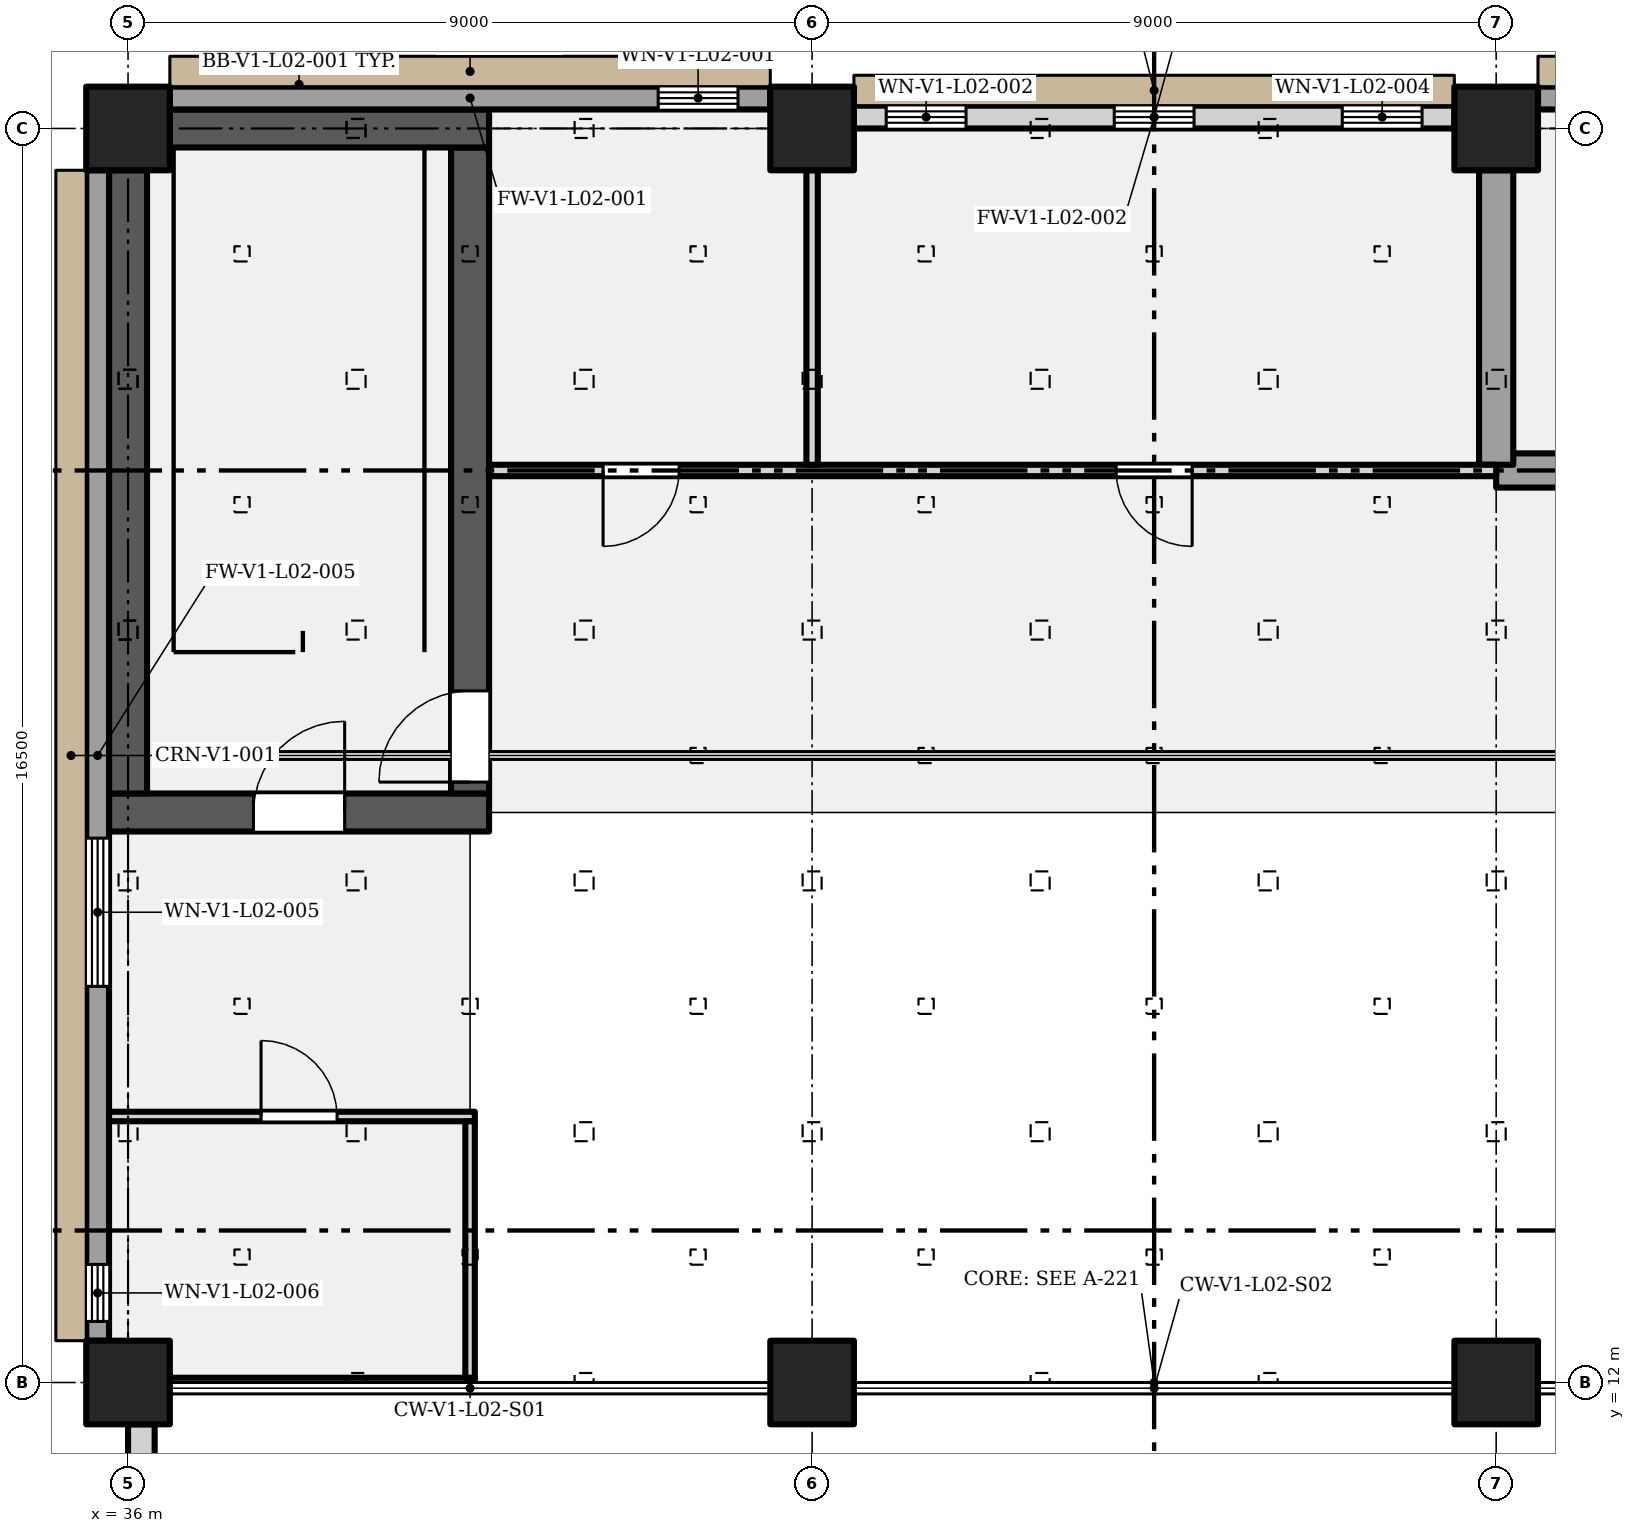
"""IFC4 building model, lengths in metres.
Left out: names, types, materials, properties, quantities, classifications, styles, units other than length and angle.
Written with IfcOpenShell. Run it as: python <this file> out.ifc"""

import sys

from ifc_helpers import new_model, si_unit, direction, frame, frame_2d, origin, origin_2d, place, context, subcontext, project, spatial, rectangle, extrude, element, fill, save


model = new_model("IFC4")
c1 = context("Model", 3, precision=1e-05, world=origin(), true_north=direction((0.0, 1.0)))
c2 = subcontext(c1, "Body", "Model", "MODEL_VIEW")
j1 = project(units=[si_unit("LENGTHUNIT", "METRE"), si_unit("PLANEANGLEUNIT", "RADIAN")], contexts=[c1])
p1 = place(None, origin())
s1 = spatial("IfcSite", under=j1, at=p1, CompositionType="ELEMENT")
p2 = place(p1, origin())
s2 = spatial("IfcBuilding", under=s1, at=p2, CompositionType="ELEMENT")
p3 = place(p2, frame((0.0, 0.0, 12.0)))
s3 = spatial("IfcBuildingStorey", under=s2, at=p3, CompositionType="ELEMENT", Elevation=12.0)
for number, where, z_axis, x_axis in (
    (1, (36.0, 12.0, 0.0), (0.0, 0.0, 1.0), (1.0, 0.0, 0.0)),
    (2, (45.0, 12.0, 0.0), (0.0, 0.0, 1.0), (1.0, 0.0, 0.0)),
    (3, (54.0, 12.0, 0.0), (0.0, 0.0, 1.0), (1.0, 0.0, 0.0)),
    (4, (36.0, 28.5, 0.0), (0.0, 0.0, 1.0), (1.0, 0.0, 0.0)),
    (5, (45.0, 28.5, 0.0), (0.0, 0.0, 1.0), (1.0, 0.0, 0.0)),
    (6, (54.0, 28.5, 0.0), (0.0, 0.0, 1.0), (1.0, 0.0, 0.0)),
):
    element("IfcColumn", number, at=place(p3, frame(where, z_axis=z_axis, x_axis=x_axis)), inside=s3, PredefinedType="COLUMN", context=c2, shape_type="SweptSolid", body=[
        extrude(rectangle(XDim=1.1, YDim=1.1, at=origin_2d()), origin(), (0.0, 0.0, 1.0), 5.4),
    ])
p4 = place(p3, frame((35.75, 19.5, 0.0), z_axis=(0.0, 0.0, 1.0), x_axis=(1.0, 0.0, 0.0)))
e7 = element("IfcWall", 7, at=p4, inside=s3, PredefinedType="SHEAR", context=c2, shape_type="SweptSolid", body=[
    extrude(rectangle(XDim=5.0, YDim=0.5, at=frame_2d((2.5, 0.0))), origin(), (0.0, 0.0, 1.0), 5.4),
])
p5 = place(p4, frame((1.9, 0.0, 0.0)))
e8 = element("IfcOpeningElement", 8, at=p5, cuts=e7, PredefinedType="OPENING", context=c2, shape_type="SweptSolid", body=[
    extrude(rectangle(XDim=1.2, YDim=2.1, at=frame_2d((0.6, 1.05))), frame((0.0, 0.26, 0.0), z_axis=(0.0, -1.0, 0.0), x_axis=(1.0, 0.0, 0.0)), (0.0, 0.0, 1.0), 0.52),
])
p6 = place(p3, frame((36.0, 19.75, 0.0), z_axis=(0.0, 0.0, 1.0), x_axis=(0.0, 1.0, 0.0)))
e9 = element("IfcWall", 9, at=p6, inside=s3, PredefinedType="SHEAR", context=c2, shape_type="SweptSolid", body=[
    extrude(rectangle(XDim=8.2, YDim=0.5, at=frame_2d((4.1, 0.0))), origin(), (0.0, 0.0, 1.0), 5.4),
])
p7 = place(p3, frame((40.5, 19.75, 0.0), z_axis=(0.0, 0.0, 1.0), x_axis=(0.0, 1.0, 0.0)))
e10 = element("IfcWall", 10, at=p7, inside=s3, PredefinedType="SHEAR", context=c2, shape_type="SweptSolid", body=[
    extrude(rectangle(XDim=8.5, YDim=0.5, at=frame_2d((4.25, 0.0))), origin(), (0.0, 0.0, 1.0), 5.4),
])
p8 = place(p7, frame((0.15, 0.0, 0.0)))
e11 = element("IfcOpeningElement", 11, at=p8, cuts=e10, PredefinedType="OPENING", context=c2, shape_type="SweptSolid", body=[
    extrude(rectangle(XDim=1.2, YDim=2.1, at=frame_2d((0.6, 1.05))), frame((0.0, 0.26, 0.0), z_axis=(0.0, -1.0, 0.0), x_axis=(1.0, 0.0, 0.0)), (0.0, 0.0, 1.0), 0.52),
])
p9 = place(p3, frame((36.55, 28.5, 0.0), z_axis=(0.0, 0.0, 1.0), x_axis=(1.0, 0.0, 0.0)))
e12 = element("IfcWall", 12, at=p9, inside=s3, PredefinedType="SHEAR", context=c2, shape_type="SweptSolid", body=[
    extrude(rectangle(XDim=4.2, YDim=0.5, at=frame_2d((2.1, 0.0))), origin(), (0.0, 0.0, 1.0), 5.4),
])
p10 = place(p3, frame((36.55, 28.9, 0.0), z_axis=(0.0, 0.0, 1.0), x_axis=(1.0, 0.0, 0.0)))
e13 = element("IfcWall", 13, at=p10, inside=s3, PredefinedType="SOLIDWALL", context=c2, shape_type="SweptSolid", body=[
    extrude(rectangle(XDim=7.9, YDim=0.3, at=frame_2d((3.95, 0.0))), origin(), (0.0, 0.0, 1.0), 5.4),
])
p11 = place(p10, frame((6.425, 0.0, 1.05)))
e14 = element("IfcOpeningElement", 14, at=p11, cuts=e13, PredefinedType="OPENING", context=c2, shape_type="SweptSolid", body=[
    extrude(rectangle(XDim=1.05, YDim=2.4, at=frame_2d((0.525, 1.2))), frame((0.0, 0.16, 0.0), z_axis=(0.0, -1.0, 0.0), x_axis=(1.0, 0.0, 0.0)), (0.0, 0.0, 1.0), 0.32),
])
p12 = place(p3, frame((45.55, 28.65, 0.0), z_axis=(0.0, 0.0, 1.0), x_axis=(1.0, 0.0, 0.0)))
e15 = element("IfcWall", 15, at=p12, inside=s3, PredefinedType="SOLIDWALL", context=c2, shape_type="SweptSolid", body=[
    extrude(rectangle(XDim=7.9, YDim=0.3, at=frame_2d((3.95, 0.0))), origin(), (0.0, 0.0, 1.0), 5.4),
])
p13 = place(p12, frame((0.425, 0.0, 1.05)))
e16 = element("IfcOpeningElement", 16, at=p13, cuts=e15, PredefinedType="OPENING", context=c2, shape_type="SweptSolid", body=[
    extrude(rectangle(XDim=1.05, YDim=2.4, at=frame_2d((0.525, 1.2))), frame((0.0, 0.16, 0.0), z_axis=(0.0, -1.0, 0.0), x_axis=(1.0, 0.0, 0.0)), (0.0, 0.0, 1.0), 0.32),
])
p14 = place(p12, frame((3.425, 0.0, 1.05)))
e17 = element("IfcOpeningElement", 17, at=p14, cuts=e15, PredefinedType="OPENING", context=c2, shape_type="SweptSolid", body=[
    extrude(rectangle(XDim=1.05, YDim=2.4, at=frame_2d((0.525, 1.2))), frame((0.0, 0.16, 0.0), z_axis=(0.0, -1.0, 0.0), x_axis=(1.0, 0.0, 0.0)), (0.0, 0.0, 1.0), 0.32),
])
p15 = place(p12, frame((6.425, 0.0, 1.05)))
e18 = element("IfcOpeningElement", 18, at=p15, cuts=e15, PredefinedType="OPENING", context=c2, shape_type="SweptSolid", body=[
    extrude(rectangle(XDim=1.05, YDim=2.4, at=frame_2d((0.525, 1.2))), frame((0.0, 0.16, 0.0), z_axis=(0.0, -1.0, 0.0), x_axis=(1.0, 0.0, 0.0)), (0.0, 0.0, 1.0), 0.32),
])
p16 = place(p3, frame((54.55, 28.9, 0.0), z_axis=(0.0, 0.0, 1.0), x_axis=(1.0, 0.0, 0.0)))
e19 = element("IfcWall", 19, at=p16, inside=s3, PredefinedType="SOLIDWALL", context=c2, shape_type="SweptSolid", body=[
    extrude(rectangle(XDim=7.9, YDim=0.3, at=frame_2d((3.95, 0.0))), origin(), (0.0, 0.0, 1.0), 5.4),
])
p17 = place(p3, frame((35.6, 12.55, 0.0), z_axis=(0.0, 0.0, 1.0), x_axis=(0.0, 1.0, 0.0)))
e20 = element("IfcWall", 20, at=p17, inside=s3, PredefinedType="SOLIDWALL", context=c2, shape_type="SweptSolid", body=[
    extrude(rectangle(XDim=15.4, YDim=0.3, at=frame_2d((7.7, 0.0))), origin(), (0.0, 0.0, 1.0), 5.4),
])
p18 = place(p17, frame((4.663, 0.0, 0.9)))
e21 = element("IfcOpeningElement", 21, at=p18, cuts=e20, PredefinedType="OPENING", context=c2, shape_type="SweptSolid", body=[
    extrude(rectangle(XDim=1.95, YDim=3.0, at=frame_2d((0.975, 1.5))), frame((0.0, 0.16, 0.0), z_axis=(0.0, -1.0, 0.0), x_axis=(1.0, 0.0, 0.0)), (0.0, 0.0, 1.0), 0.32),
])
p19 = place(p17, frame((0.254, 0.0, 1.2)))
e22 = element("IfcOpeningElement", 22, at=p19, cuts=e20, PredefinedType="OPENING", context=c2, shape_type="SweptSolid", body=[
    extrude(rectangle(XDim=0.75, YDim=3.6, at=frame_2d((0.375, 1.8))), frame((0.0, 0.16, 0.0), z_axis=(0.0, -1.0, 0.0), x_axis=(1.0, 0.0, 0.0)), (0.0, 0.0, 1.0), 0.32),
])
p20 = place(p3, frame((36.175, 0.7, 0.0), z_axis=(0.0, 0.0, 1.0), x_axis=(0.0, 1.0, 0.0)))
e23 = element("IfcWall", 23, at=p20, inside=s3, PredefinedType="SOLIDWALL", context=c2, shape_type="SweptSolid", body=[
    extrude(rectangle(XDim=10.75, YDim=0.35, at=frame_2d((5.375, 0.0))), origin(), (0.0, 0.0, 1.0), 5.4),
])
p21 = place(p3, frame((36.55, 12.0, 0.0), z_axis=(0.0, 0.0, 1.0), x_axis=(1.0, 0.0, 0.0)))
e24 = element("IfcWall", 24, at=p21, inside=s3, PredefinedType="PARTITIONING", context=c2, shape_type="SweptSolid", body=[
    extrude(rectangle(XDim=4.012, YDim=0.125, at=frame_2d((2.006, 0.0))), origin(), (0.0, 0.0, 1.0), 5.4),
])
p22 = place(p3, frame((35.75, 15.5, 0.0), z_axis=(0.0, 0.0, 1.0), x_axis=(1.0, 0.0, 0.0)))
e25 = element("IfcWall", 25, at=p22, inside=s3, PredefinedType="PARTITIONING", context=c2, shape_type="SweptSolid", body=[
    extrude(rectangle(XDim=4.812, YDim=0.125, at=frame_2d((2.406, 0.0))), origin(), (0.0, 0.0, 1.0), 5.4),
])
p23 = place(p22, frame((2.0, 0.0, 0.0)))
e26 = element("IfcOpeningElement", 26, at=p23, cuts=e25, PredefinedType="OPENING", context=c2, shape_type="SweptSolid", body=[
    extrude(rectangle(XDim=1.0, YDim=2.4, at=frame_2d((0.5, 1.2))), frame((0.0, 0.073, 0.0), z_axis=(0.0, -1.0, 0.0), x_axis=(1.0, 0.0, 0.0)), (0.0, 0.0, 1.0), 0.145),
])
p24 = place(p3, frame((40.75, 24.0, 0.0), z_axis=(0.0, 0.0, 1.0), x_axis=(1.0, 0.0, 0.0)))
e27 = element("IfcWall", 27, at=p24, inside=s3, PredefinedType="PARTITIONING", context=c2, shape_type="SweptSolid", body=[
    extrude(rectangle(XDim=13.25, YDim=0.15, at=frame_2d((6.625, 0.0))), origin(), (0.0, 0.0, 1.0), 5.4),
])
p25 = place(p24, frame((2.5, 0.0, 0.0), z_axis=(0.0, 0.0, 1.0), x_axis=(-1.0, 0.0, 0.0)))
e28 = element("IfcOpeningElement", 28, at=p25, cuts=e27, PredefinedType="OPENING", context=c2, shape_type="SweptSolid", body=[
    extrude(rectangle(XDim=1.0, YDim=2.4, at=frame_2d((0.5, 1.2))), frame((0.0, 0.085, 0.0), z_axis=(0.0, -1.0, 0.0), x_axis=(1.0, 0.0, 0.0)), (0.0, 0.0, 1.0), 0.17),
])
p26 = place(p24, frame((9.25, 0.0, 0.0), z_axis=(0.0, 0.0, 1.0), x_axis=(-1.0, 0.0, 0.0)))
e29 = element("IfcOpeningElement", 29, at=p26, cuts=e27, PredefinedType="OPENING", context=c2, shape_type="SweptSolid", body=[
    extrude(rectangle(XDim=1.0, YDim=2.4, at=frame_2d((0.5, 1.2))), frame((0.0, 0.085, 0.0), z_axis=(0.0, -1.0, 0.0), x_axis=(1.0, 0.0, 0.0)), (0.0, 0.0, 1.0), 0.17),
])
p27 = place(p3, frame((54.0, 24.0, 0.0), z_axis=(0.0, 0.0, 1.0), x_axis=(1.0, 0.0, 0.0)))
e30 = element("IfcWall", 30, at=p27, inside=s3, PredefinedType="PARTITIONING", context=c2, shape_type="SweptSolid", body=[
    extrude(rectangle(XDim=4.25, YDim=0.45, at=frame_2d((2.125, 0.0))), origin(), (0.0, 0.0, 1.0), 5.4),
])
p28 = place(p27, frame((2.7, 0.0, 0.0), z_axis=(0.0, 0.0, 1.0), x_axis=(-1.0, 0.0, 0.0)))
e31 = element("IfcOpeningElement", 31, at=p28, cuts=e30, PredefinedType="OPENING", context=c2, shape_type="SweptSolid", body=[
    extrude(rectangle(XDim=0.9, YDim=2.4, at=frame_2d((0.45, 1.2))), frame((0.0, 0.235, 0.0), z_axis=(0.0, -1.0, 0.0), x_axis=(1.0, 0.0, 0.0)), (0.0, 0.0, 1.0), 0.47),
])
p29 = place(p3, frame((40.5, 12.062, 0.0), z_axis=(0.0, 0.0, 1.0), x_axis=(0.0, 1.0, 0.0)))
e32 = element("IfcWall", 32, at=p29, inside=s3, PredefinedType="PARTITIONING", context=c2, shape_type="SweptSolid", body=[
    extrude(rectangle(XDim=3.375, YDim=0.125, at=frame_2d((1.688, 0.0))), origin(), (0.0, 0.0, 1.0), 5.4),
])
p30 = place(p3, frame((45.0, 24.075, 0.0), z_axis=(0.0, 0.0, 1.0), x_axis=(0.0, 1.0, 0.0)))
e33 = element("IfcWall", 33, at=p30, inside=s3, PredefinedType="PARTITIONING", context=c2, shape_type="SweptSolid", body=[
    extrude(rectangle(XDim=3.875, YDim=0.15, at=frame_2d((1.938, 0.0))), origin(), (0.0, 0.0, 1.0), 5.4),
])
p31 = place(p3, frame((54.0, 24.075, 0.0), z_axis=(0.0, 0.0, 1.0), x_axis=(0.0, 1.0, 0.0)))
e34 = element("IfcWall", 34, at=p31, inside=s3, PredefinedType="PARTITIONING", context=c2, shape_type="SweptSolid", body=[
    extrude(rectangle(XDim=3.875, YDim=0.45, at=frame_2d((1.938, 0.0))), origin(), (0.0, 0.0, 1.0), 5.4),
])
p32 = place(p11, origin())
e35 = element("IfcWindow", 35, at=p32, inside=s3, PartitioningType="SINGLE_PANEL", PredefinedType="WINDOW", context=c2, shape_type="SweptSolid", body=[
    extrude(rectangle(XDim=1.05, YDim=2.4, at=frame_2d((0.525, 1.2))), frame((0.0, 0.03, 0.0), z_axis=(0.0, -1.0, 0.0), x_axis=(1.0, 0.0, 0.0)), (0.0, 0.0, 1.0), 0.06),
])
fill(e14, e35)
p33 = place(p13, origin())
e36 = element("IfcWindow", 36, at=p33, inside=s3, PartitioningType="SINGLE_PANEL", PredefinedType="WINDOW", context=c2, shape_type="SweptSolid", body=[
    extrude(rectangle(XDim=1.05, YDim=2.4, at=frame_2d((0.525, 1.2))), frame((0.0, 0.03, 0.0), z_axis=(0.0, -1.0, 0.0), x_axis=(1.0, 0.0, 0.0)), (0.0, 0.0, 1.0), 0.06),
])
fill(e16, e36)
p34 = place(p14, origin())
e37 = element("IfcWindow", 37, at=p34, inside=s3, PartitioningType="SINGLE_PANEL", PredefinedType="WINDOW", context=c2, shape_type="SweptSolid", body=[
    extrude(rectangle(XDim=1.05, YDim=2.4, at=frame_2d((0.525, 1.2))), frame((0.0, 0.03, 0.0), z_axis=(0.0, -1.0, 0.0), x_axis=(1.0, 0.0, 0.0)), (0.0, 0.0, 1.0), 0.06),
])
fill(e17, e37)
p35 = place(p15, origin())
e38 = element("IfcWindow", 38, at=p35, inside=s3, PartitioningType="SINGLE_PANEL", PredefinedType="WINDOW", context=c2, shape_type="SweptSolid", body=[
    extrude(rectangle(XDim=1.05, YDim=2.4, at=frame_2d((0.525, 1.2))), frame((0.0, 0.03, 0.0), z_axis=(0.0, -1.0, 0.0), x_axis=(1.0, 0.0, 0.0)), (0.0, 0.0, 1.0), 0.06),
])
fill(e18, e38)
p36 = place(p18, origin())
e39 = element("IfcWindow", 39, at=p36, inside=s3, PartitioningType="SINGLE_PANEL", PredefinedType="WINDOW", context=c2, shape_type="SweptSolid", body=[
    extrude(rectangle(XDim=1.95, YDim=3.0, at=frame_2d((0.975, 1.5))), frame((0.0, 0.03, 0.0), z_axis=(0.0, -1.0, 0.0), x_axis=(1.0, 0.0, 0.0)), (0.0, 0.0, 1.0), 0.06),
])
fill(e21, e39)
p37 = place(p19, origin())
e40 = element("IfcWindow", 40, at=p37, inside=s3, PartitioningType="SINGLE_PANEL", PredefinedType="WINDOW", context=c2, shape_type="SweptSolid", body=[
    extrude(rectangle(XDim=0.75, YDim=3.6, at=frame_2d((0.375, 1.8))), frame((0.0, 0.03, 0.0), z_axis=(0.0, -1.0, 0.0), x_axis=(1.0, 0.0, 0.0)), (0.0, 0.0, 1.0), 0.06),
])
fill(e22, e40)
p38 = place(p5, origin())
e41 = element("IfcDoor", 41, at=p38, inside=s3, OperationType="SINGLE_SWING_RIGHT", PredefinedType="DOOR", context=c2, shape_type="SweptSolid", body=[
    extrude(rectangle(XDim=1.2, YDim=2.1, at=frame_2d((0.6, 1.05))), frame((0.0, 0.025, 0.0), z_axis=(0.0, -1.0, 0.0), x_axis=(1.0, 0.0, 0.0)), (0.0, 0.0, 1.0), 0.05),
])
fill(e8, e41)
p39 = place(p23, origin())
e42 = element("IfcDoor", 42, at=p39, inside=s3, OperationType="SINGLE_SWING_LEFT", PredefinedType="DOOR", context=c2, shape_type="SweptSolid", body=[
    extrude(rectangle(XDim=1.0, YDim=2.4, at=frame_2d((0.5, 1.2))), frame((0.0, 0.025, 0.0), z_axis=(0.0, -1.0, 0.0), x_axis=(1.0, 0.0, 0.0)), (0.0, 0.0, 1.0), 0.05),
])
fill(e26, e42)
p40 = place(p8, origin())
e43 = element("IfcDoor", 43, at=p40, inside=s3, OperationType="SINGLE_SWING_LEFT", PredefinedType="DOOR", context=c2, shape_type="SweptSolid", body=[
    extrude(rectangle(XDim=1.2, YDim=2.1, at=frame_2d((0.6, 1.05))), frame((0.0, 0.025, 0.0), z_axis=(0.0, -1.0, 0.0), x_axis=(1.0, 0.0, 0.0)), (0.0, 0.0, 1.0), 0.05),
])
fill(e11, e43)
p41 = place(p25, origin())
e44 = element("IfcDoor", 44, at=p41, inside=s3, OperationType="SINGLE_SWING_RIGHT", PredefinedType="DOOR", context=c2, shape_type="SweptSolid", body=[
    extrude(rectangle(XDim=1.0, YDim=2.4, at=frame_2d((0.5, 1.2))), frame((0.0, 0.025, 0.0), z_axis=(0.0, -1.0, 0.0), x_axis=(1.0, 0.0, 0.0)), (0.0, 0.0, 1.0), 0.05),
])
fill(e28, e44)
p42 = place(p26, origin())
e45 = element("IfcDoor", 45, at=p42, inside=s3, OperationType="SINGLE_SWING_LEFT", PredefinedType="DOOR", context=c2, shape_type="SweptSolid", body=[
    extrude(rectangle(XDim=1.0, YDim=2.4, at=frame_2d((0.5, 1.2))), frame((0.0, 0.025, 0.0), z_axis=(0.0, -1.0, 0.0), x_axis=(1.0, 0.0, 0.0)), (0.0, 0.0, 1.0), 0.05),
])
fill(e29, e45)
save(model, sys.argv[1])
